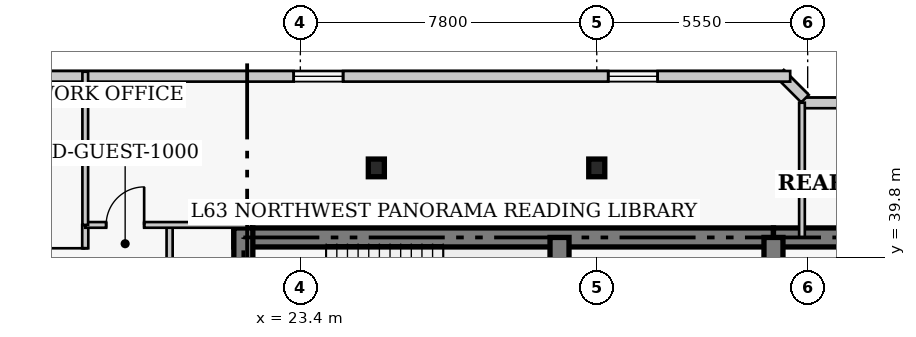
"""IFC4 building model, lengths in metres.
Left out: names, types, materials, properties, quantities, classifications, styles, units other than length and angle.
Written with IfcOpenShell. Run it as: python <this file> out.ifc"""

import sys

from ifc_helpers import new_model, si_unit, direction, frame, frame_2d, origin, origin_2d, place, context, subcontext, project, spatial, rectangle, i_section, extrude, element, fill, save


model = new_model("IFC4")
c1 = context("Model", 3, precision=1e-05, world=origin(), true_north=direction((0.0, 1.0)))
c2 = subcontext(c1, "Body", "Model", "MODEL_VIEW")
j1 = project(units=[si_unit("LENGTHUNIT", "METRE"), si_unit("PLANEANGLEUNIT", "RADIAN")], contexts=[c1])
p1 = place(None, origin())
s1 = spatial("IfcSite", under=j1, at=p1, CompositionType="ELEMENT")
p2 = place(p1, origin())
s2 = spatial("IfcBuilding", under=s1, at=p2, CompositionType="ELEMENT")
p3 = place(p2, frame((0.0, 0.0, 253.4)))
s3 = spatial("IfcBuildingStorey", under=s2, at=p3, CompositionType="ELEMENT", Elevation=253.4)
p4 = place(p3, frame((21.65, 40.32, 0.0), z_axis=(0.0, 0.0, 1.0), x_axis=(1.0, 0.0, 0.0)))
e1 = element("IfcWall", 1, at=p4, inside=s3, PredefinedType="SHEAR", context=c2, shape_type="SweptSolid", body=[
    extrude(rectangle(XDim=14.2, YDim=0.5, at=frame_2d((7.1, 0.0))), origin(), (0.0, 0.0, 1.0), 4.0),
])
p5 = place(p3, frame((35.85, 40.32, 0.0), z_axis=(0.0, 0.0, 1.0), x_axis=(1.0, 0.0, 0.0)))
e2 = element("IfcWall", 2, at=p5, inside=s3, PredefinedType="SHEAR", context=c2, shape_type="SweptSolid", body=[
    extrude(rectangle(XDim=12.6, YDim=0.5, at=frame_2d((6.3, 0.0))), origin(), (0.0, 0.0, 1.0), 4.0),
])
p6 = place(p3, frame((21.9, 27.05, 0.0), z_axis=(0.0, 0.0, 1.0), x_axis=(0.0, 1.0, 0.0)))
e3 = element("IfcWall", 3, at=p6, inside=s3, PredefinedType="SHEAR", context=c2, shape_type="SweptSolid", body=[
    extrude(rectangle(XDim=13.52, YDim=0.5, at=frame_2d((6.76, 0.0))), origin(), (0.0, 0.0, 1.0), 4.0),
])
p7 = place(p3, frame((30.22, 33.0, 0.0), z_axis=(0.0, 0.0, 1.0), x_axis=(0.0, 1.0, 0.0)))
e4 = element("IfcWall", 4, at=p7, inside=s3, PredefinedType="SHEAR", context=c2, shape_type="SweptSolid", body=[
    extrude(rectangle(XDim=7.32, YDim=0.5, at=frame_2d((3.66, 0.0))), origin(), (0.0, 0.0, 1.0), 4.0),
])
p8 = place(p3, frame((35.85, 36.37, 0.0), z_axis=(0.0, 0.0, 1.0), x_axis=(0.0, 1.0, 0.0)))
e5 = element("IfcWall", 5, at=p8, inside=s3, PredefinedType="SHEAR", context=c2, shape_type="SweptSolid", body=[
    extrude(rectangle(XDim=3.95, YDim=0.5, at=frame_2d((1.975, 0.0))), origin(), (0.0, 0.0, 1.0), 4.0),
])
p9 = place(p8, frame((0.88, 0.0, 0.0)))
e6 = element("IfcOpeningElement", 6, at=p9, cuts=e5, PredefinedType="OPENING", context=c2, shape_type="SweptSolid", body=[
    extrude(rectangle(XDim=1.1, YDim=2.15, at=frame_2d((0.55, 1.075))), frame((0.0, 0.26, 0.0), z_axis=(0.0, -1.0, 0.0), x_axis=(1.0, 0.0, 0.0)), (0.0, 0.0, 1.0), 0.52),
])
for number, where, z_axis, x_axis in (
    (7, (25.4, 42.15, 0.0), (0.0, 0.0, 1.0), (1.0, 0.0, 0.0)),
    (8, (31.2, 42.15, 0.0), (0.0, 0.0, 1.0), (1.0, 0.0, 0.0)),
):
    element("IfcColumn", number, at=place(p3, frame(where, z_axis=z_axis, x_axis=x_axis)), inside=s3, PredefinedType="COLUMN", context=c2, shape_type="SweptSolid", body=[
        extrude(i_section(OverallWidth=0.422, OverallDepth=0.465, WebThickness=0.045, FlangeThickness=0.073, FilletRadius=0.017, at=origin_2d()), origin(), (0.0, 0.0, 1.0), 4.0),
    ])
p10 = place(p3, frame((41.39, 43.86, 0.0), z_axis=(0.0, 0.0, 1.0), x_axis=(-1.0, 0.0, 0.0)))
e9 = element("IfcWall", 9, at=p10, inside=s3, PredefinedType="SOLIDWALL", context=c2, shape_type="SweptSolid", body=[
    extrude(rectangle(XDim=4.78, YDim=0.28, at=frame_2d((2.39, 0.0))), origin(), (0.0, 0.0, 1.0), 3.76),
])
p11 = place(p10, frame((1.74, 0.0, 0.85)))
e10 = element("IfcOpeningElement", 10, at=p11, cuts=e9, PredefinedType="OPENING", context=c2, shape_type="SweptSolid", body=[
    extrude(rectangle(XDim=1.3, YDim=1.7, at=frame_2d((0.65, 0.85))), frame((0.0, 0.15, 0.0), z_axis=(0.0, -1.0, 0.0), x_axis=(1.0, 0.0, 0.0)), (0.0, 0.0, 1.0), 0.3),
])
p12 = place(p3, frame((36.679, 43.973, 0.0), z_axis=(0.0, 0.0, 1.0), x_axis=(-0.706975312048, 0.707238225886, 0.0)))
e11 = element("IfcWall", 11, at=p12, inside=s3, PredefinedType="SOLIDWALL", context=c2, shape_type="SweptSolid", body=[
    extrude(rectangle(XDim=0.929, YDim=0.28, at=frame_2d((0.464, 0.0))), origin(), (0.0, 0.0, 1.0), 3.76),
])
p13 = place(p3, frame((36.29, 44.56, 0.0), z_axis=(0.0, 0.0, 1.0), x_axis=(-1.0, 0.0, 0.0)))
e12 = element("IfcWall", 12, at=p13, inside=s3, PredefinedType="SOLIDWALL", context=c2, shape_type="SweptSolid", body=[
    extrude(rectangle(XDim=24.83, YDim=0.28, at=frame_2d((12.415, 0.0))), origin(), (0.0, 0.0, 1.0), 3.76),
])
p14 = place(p13, frame((3.488, 0.0, 0.85)))
e13 = element("IfcOpeningElement", 13, at=p14, cuts=e12, PredefinedType="OPENING", context=c2, shape_type="SweptSolid", body=[
    extrude(rectangle(XDim=1.3, YDim=1.7, at=frame_2d((0.65, 0.85))), frame((0.0, 0.15, 0.0), z_axis=(0.0, -1.0, 0.0), x_axis=(1.0, 0.0, 0.0)), (0.0, 0.0, 1.0), 0.3),
])
p15 = place(p13, frame((11.765, 0.0, 0.85)))
e14 = element("IfcOpeningElement", 14, at=p15, cuts=e12, PredefinedType="OPENING", context=c2, shape_type="SweptSolid", body=[
    extrude(rectangle(XDim=1.3, YDim=1.7, at=frame_2d((0.65, 0.85))), frame((0.0, 0.15, 0.0), z_axis=(0.0, -1.0, 0.0), x_axis=(1.0, 0.0, 0.0)), (0.0, 0.0, 1.0), 0.3),
])
p16 = place(p13, frame((20.042, 0.0, 0.85)))
e15 = element("IfcOpeningElement", 15, at=p16, cuts=e12, PredefinedType="OPENING", context=c2, shape_type="SweptSolid", body=[
    extrude(rectangle(XDim=1.3, YDim=1.7, at=frame_2d((0.65, 0.85))), frame((0.0, 0.15, 0.0), z_axis=(0.0, -1.0, 0.0), x_axis=(1.0, 0.0, 0.0)), (0.0, 0.0, 1.0), 0.3),
])
p17 = place(p3, frame((17.74, 8.55, 0.0), z_axis=(0.0, 0.0, 1.0), x_axis=(0.0, 1.0, 0.0)))
e16 = element("IfcWall", 16, at=p17, inside=s3, PredefinedType="PARTITIONING", context=c2, shape_type="SweptSolid", body=[
    extrude(rectangle(XDim=32.1, YDim=0.16, at=frame_2d((16.05, 0.0))), origin(), (0.0, 0.0, 1.0), 3.76),
])
p18 = place(p17, frame((5.25, 0.0, 0.0)))
e17 = element("IfcOpeningElement", 17, at=p18, cuts=e16, PredefinedType="OPENING", context=c2, shape_type="SweptSolid", body=[
    extrude(rectangle(XDim=0.95, YDim=2.1, at=frame_2d((0.475, 1.05))), frame((0.0, 0.09, 0.0), z_axis=(0.0, -1.0, 0.0), x_axis=(1.0, 0.0, 0.0)), (0.0, 0.0, 1.0), 0.18),
])
p19 = place(p17, frame((15.375, 0.0, 0.0)))
e18 = element("IfcOpeningElement", 18, at=p19, cuts=e16, PredefinedType="OPENING", context=c2, shape_type="SweptSolid", body=[
    extrude(rectangle(XDim=0.95, YDim=2.1, at=frame_2d((0.475, 1.05))), frame((0.0, 0.09, 0.0), z_axis=(0.0, -1.0, 0.0), x_axis=(1.0, 0.0, 0.0)), (0.0, 0.0, 1.0), 0.18),
])
p20 = place(p17, frame((23.775, 0.0, 0.0)))
e19 = element("IfcOpeningElement", 19, at=p20, cuts=e16, PredefinedType="OPENING", context=c2, shape_type="SweptSolid", body=[
    extrude(rectangle(XDim=0.95, YDim=2.1, at=frame_2d((0.475, 1.05))), frame((0.0, 0.09, 0.0), z_axis=(0.0, -1.0, 0.0), x_axis=(1.0, 0.0, 0.0)), (0.0, 0.0, 1.0), 0.18),
])
p21 = place(p17, frame((30.486, 0.0, 0.0)))
e20 = element("IfcOpeningElement", 20, at=p21, cuts=e16, PredefinedType="OPENING", context=c2, shape_type="SweptSolid", body=[
    extrude(rectangle(XDim=1.0, YDim=2.15, at=frame_2d((0.5, 1.075))), frame((0.0, 0.09, 0.0), z_axis=(0.0, -1.0, 0.0), x_axis=(1.0, 0.0, 0.0)), (0.0, 0.0, 1.0), 0.18),
])
p22 = place(p3, frame((19.96, 35.02, 0.0), z_axis=(0.0, 0.0, 1.0), x_axis=(0.0, 1.0, 0.0)))
e21 = element("IfcWall", 21, at=p22, inside=s3, PredefinedType="PARTITIONING", context=c2, shape_type="SweptSolid", body=[
    extrude(rectangle(XDim=5.63, YDim=0.16, at=frame_2d((2.815, 0.0))), origin(), (0.0, 0.0, 1.0), 3.76),
])
p23 = place(p3, frame((17.74, 40.65, 0.0), z_axis=(0.0, 0.0, 1.0), x_axis=(1.0, 0.0, 0.0)))
e22 = element("IfcWall", 22, at=p23, inside=s3, PredefinedType="PARTITIONING", context=c2, shape_type="SweptSolid", body=[
    extrude(rectangle(XDim=4.36, YDim=0.15, at=frame_2d((2.18, 0.0))), origin(), (0.0, 0.0, 1.0), 3.76),
])
p24 = place(p23, frame((0.55, 0.0, 0.0)))
e23 = element("IfcOpeningElement", 23, at=p24, cuts=e22, PredefinedType="OPENING", context=c2, shape_type="SweptSolid", body=[
    extrude(rectangle(XDim=1.0, YDim=2.15, at=frame_2d((0.5, 1.075))), frame((0.0, 0.085, 0.0), z_axis=(0.0, -1.0, 0.0), x_axis=(1.0, 0.0, 0.0)), (0.0, 0.0, 1.0), 0.17),
])
p25 = place(p3, frame((17.74, 40.65, 0.0), z_axis=(0.0, 0.0, 1.0), x_axis=(0.0, 1.0, 0.0)))
e24 = element("IfcWall", 24, at=p25, inside=s3, PredefinedType="PARTITIONING", context=c2, shape_type="SweptSolid", body=[
    extrude(rectangle(XDim=4.03, YDim=0.15, at=frame_2d((2.015, 0.0))), origin(), (0.0, 0.0, 1.0), 3.76),
])
p26 = place(p3, frame((36.6, 40.32, 0.0), z_axis=(0.0, 0.0, 1.0), x_axis=(0.0, 1.0, 0.0)))
e25 = element("IfcWall", 25, at=p26, inside=s3, PredefinedType="PARTITIONING", context=c2, shape_type="SweptSolid", body=[
    extrude(rectangle(XDim=3.545, YDim=0.15, at=frame_2d((1.772, 0.0))), origin(), (0.0, 0.0, 1.0), 3.76),
])
p27 = place(p14, origin())
e26 = element("IfcWindow", 26, at=p27, inside=s3, PartitioningType="SINGLE_PANEL", PredefinedType="WINDOW", context=c2, shape_type="SweptSolid", body=[
    extrude(rectangle(XDim=1.3, YDim=1.7, at=frame_2d((0.65, 0.85))), frame((0.0, 0.03, 0.0), z_axis=(0.0, -1.0, 0.0), x_axis=(1.0, 0.0, 0.0)), (0.0, 0.0, 1.0), 0.06),
])
fill(e13, e26)
p28 = place(p15, origin())
e27 = element("IfcWindow", 27, at=p28, inside=s3, PartitioningType="SINGLE_PANEL", PredefinedType="WINDOW", context=c2, shape_type="SweptSolid", body=[
    extrude(rectangle(XDim=1.3, YDim=1.7, at=frame_2d((0.65, 0.85))), frame((0.0, 0.03, 0.0), z_axis=(0.0, -1.0, 0.0), x_axis=(1.0, 0.0, 0.0)), (0.0, 0.0, 1.0), 0.06),
])
fill(e14, e27)
p29 = place(p24, origin())
e28 = element("IfcDoor", 28, at=p29, inside=s3, OperationType="SINGLE_SWING_RIGHT", PredefinedType="DOOR", context=c2, shape_type="SweptSolid", body=[
    extrude(rectangle(XDim=1.0, YDim=2.15, at=frame_2d((0.5, 1.075))), frame((0.0, 0.025, 0.0), z_axis=(0.0, -1.0, 0.0), x_axis=(1.0, 0.0, 0.0)), (0.0, 0.0, 1.0), 0.05),
])
fill(e23, e28)
p30 = place(p21, origin())
e29 = element("IfcDoor", 29, at=p30, inside=s3, OperationType="SINGLE_SWING_RIGHT", PredefinedType="DOOR", context=c2, shape_type="SweptSolid", body=[
    extrude(rectangle(XDim=1.0, YDim=2.15, at=frame_2d((0.5, 1.075))), frame((0.0, 0.025, 0.0), z_axis=(0.0, -1.0, 0.0), x_axis=(1.0, 0.0, 0.0)), (0.0, 0.0, 1.0), 0.05),
])
fill(e20, e29)
save(model, sys.argv[1])
